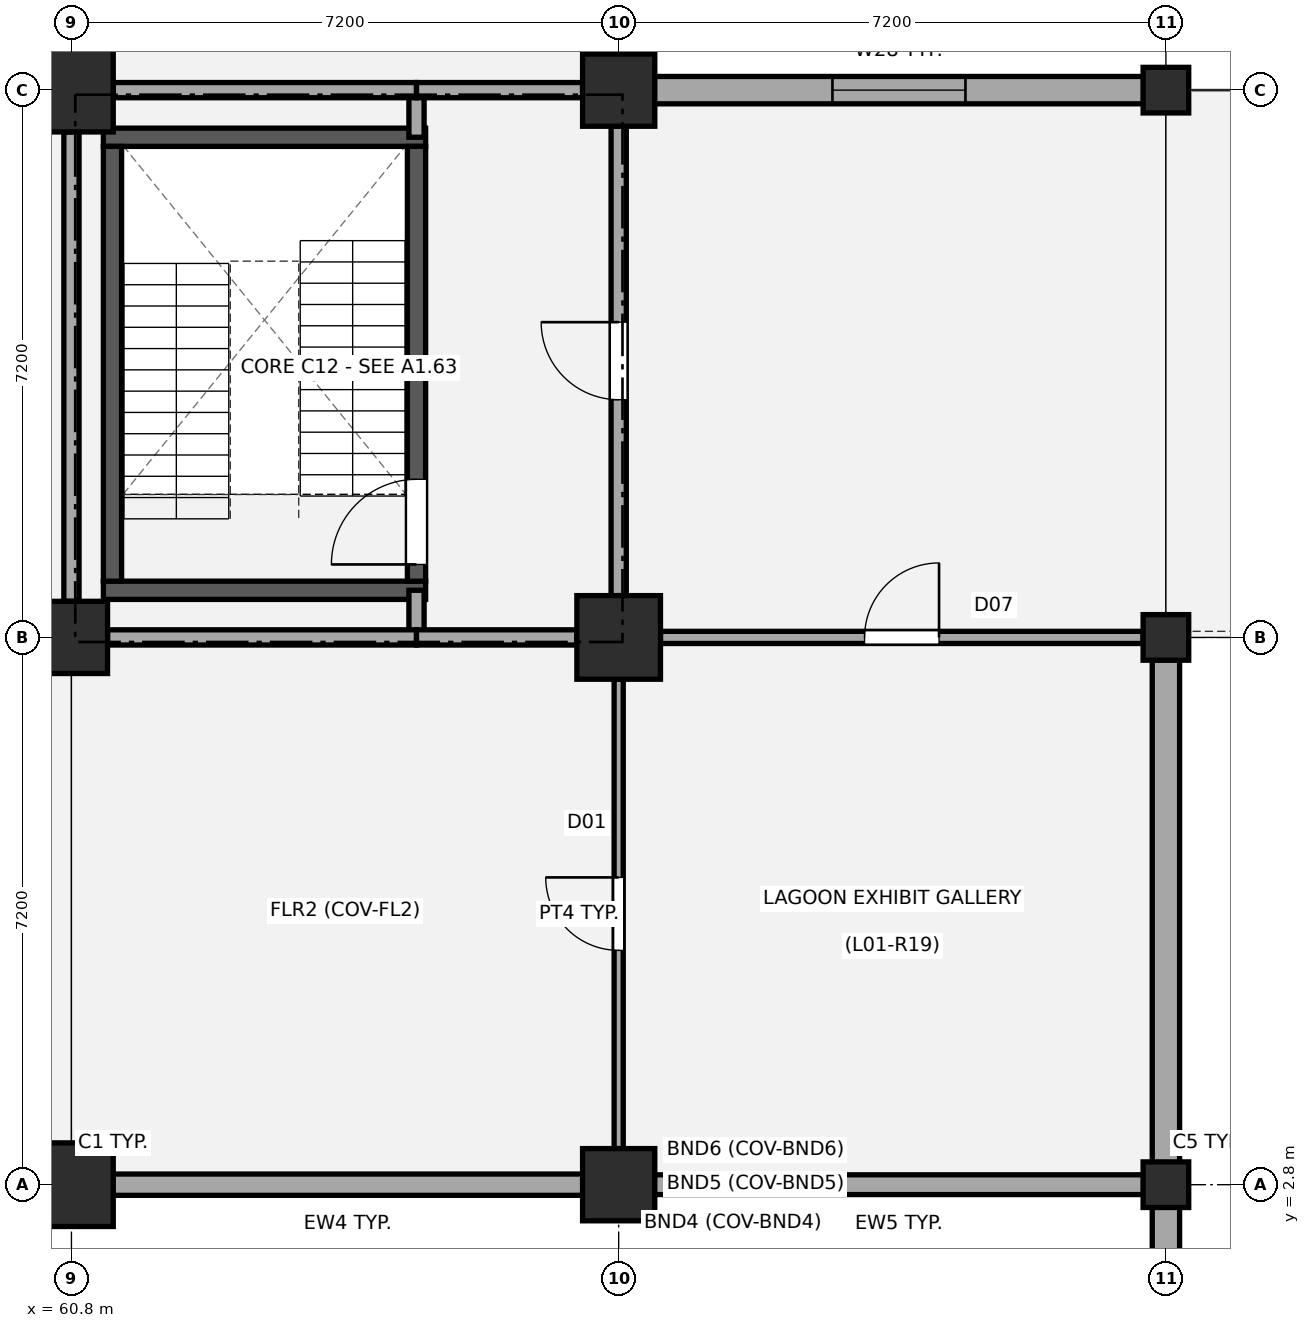
"""IFC4 building model, lengths in metres.
Left out: names, types, materials, properties, quantities, classifications, styles, units other than length and angle.
Written with IfcOpenShell. Run it as: python <this file> out.ifc"""

import sys

from ifc_helpers import new_model, si_unit, direction, frame, frame_2d, origin, origin_2d, place, context, subcontext, project, spatial, rectangle, extrude, element, fill, save


model = new_model("IFC4")
c1 = context("Model", 3, precision=1e-05, world=origin(), true_north=direction((0.0, 1.0)))
c2 = subcontext(c1, "Body", "Model", "MODEL_VIEW")
j1 = project(units=[si_unit("LENGTHUNIT", "METRE"), si_unit("PLANEANGLEUNIT", "RADIAN")], contexts=[c1])
p1 = place(None, origin())
s1 = spatial("IfcSite", under=j1, at=p1, CompositionType="ELEMENT")
p2 = place(p1, origin())
s2 = spatial("IfcBuilding", under=s1, at=p2, CompositionType="ELEMENT")
p3 = place(p2, frame((0.0, 0.0, 4.68)))
s3 = spatial("IfcBuildingStorey", under=s2, at=p3, CompositionType="ELEMENT", Elevation=4.68)
p4 = place(p3, frame((60.8, 2.8, 0.0), z_axis=(0.0, 0.0, 1.0), x_axis=(1.0, 0.0, 0.0)))
e1 = element("IfcColumn", 1, at=p4, inside=s3, PredefinedType="COLUMN", context=c2, shape_type="SweptSolid", body=[
    extrude(rectangle(XDim=1.1, YDim=1.1, at=origin_2d()), origin(), (0.0, 0.0, 1.0), 4.5),
])
p5 = place(p3, frame((60.8, 10.0, 0.0), z_axis=(0.0, 0.0, 1.0), x_axis=(1.0, 0.0, 0.0)))
e2 = element("IfcColumn", 2, at=p5, inside=s3, PredefinedType="COLUMN", context=c2, shape_type="SweptSolid", body=[
    extrude(rectangle(XDim=0.95, YDim=0.95, at=origin_2d()), origin(), (0.0, 0.0, 1.0), 4.5),
])
p6 = place(p3, frame((60.8, 17.2, 0.0), z_axis=(0.0, 0.0, 1.0), x_axis=(1.0, 0.0, 0.0)))
e3 = element("IfcColumn", 3, at=p6, inside=s3, PredefinedType="COLUMN", context=c2, shape_type="SweptSolid", body=[
    extrude(rectangle(XDim=1.1, YDim=1.1, at=origin_2d()), origin(), (0.0, 0.0, 1.0), 4.5),
])
p7 = place(p3, frame((68.0, 2.8, 0.0), z_axis=(0.0, 0.0, 1.0), x_axis=(1.0, 0.0, 0.0)))
e4 = element("IfcColumn", 4, at=p7, inside=s3, PredefinedType="COLUMN", context=c2, shape_type="SweptSolid", body=[
    extrude(rectangle(XDim=0.95, YDim=0.95, at=origin_2d()), origin(), (0.0, 0.0, 1.0), 4.5),
])
p8 = place(p3, frame((68.0, 10.0, 0.0), z_axis=(0.0, 0.0, 1.0), x_axis=(1.0, 0.0, 0.0)))
e5 = element("IfcColumn", 5, at=p8, inside=s3, PredefinedType="COLUMN", context=c2, shape_type="SweptSolid", body=[
    extrude(rectangle(XDim=1.1, YDim=1.1, at=origin_2d()), origin(), (0.0, 0.0, 1.0), 4.5),
])
p9 = place(p3, frame((68.0, 17.2, 0.0), z_axis=(0.0, 0.0, 1.0), x_axis=(1.0, 0.0, 0.0)))
e6 = element("IfcColumn", 6, at=p9, inside=s3, PredefinedType="COLUMN", context=c2, shape_type="SweptSolid", body=[
    extrude(rectangle(XDim=0.95, YDim=0.95, at=origin_2d()), origin(), (0.0, 0.0, 1.0), 4.5),
])
for number, where, z_axis, x_axis in (
    (7, (75.2, 2.8, 0.0), (0.0, 0.0, 1.0), (1.0, 0.0, 0.0)),
    (8, (75.2, 10.0, 0.0), (0.0, 0.0, 1.0), (1.0, 0.0, 0.0)),
    (9, (75.2, 17.2, 0.0), (0.0, 0.0, 1.0), (1.0, 0.0, 0.0)),
):
    element("IfcColumn", number, at=place(p3, frame(where, z_axis=z_axis, x_axis=x_axis)), inside=s3, PredefinedType="COLUMN", context=c2, shape_type="SweptSolid", body=[
        extrude(rectangle(XDim=0.6, YDim=0.6, at=origin_2d()), origin(), (0.0, 0.0, 1.0), 4.5),
    ])
p10 = place(p3, frame((67.53, 2.8, 0.0), z_axis=(0.0, 0.0, 1.0), x_axis=(-1.0, 0.0, 0.0)))
e10 = element("IfcWall", 10, at=p10, inside=s3, PredefinedType="STANDARD", context=c2, shape_type="SweptSolid", body=[
    extrude(rectangle(XDim=6.185, YDim=0.28, at=frame_2d((3.093, 0.0))), origin(), (0.0, 0.0, 1.0), 3.49),
])
p11 = place(p3, frame((74.905, 2.8, 0.0), z_axis=(0.0, 0.0, 1.0), x_axis=(-1.0, 0.0, 0.0)))
e11 = element("IfcWall", 11, at=p11, inside=s3, PredefinedType="STANDARD", context=c2, shape_type="SweptSolid", body=[
    extrude(rectangle(XDim=6.435, YDim=0.26, at=frame_2d((3.218, 0.0))), origin(), (0.0, 0.0, 1.0), 3.51),
])
p12 = place(p3, frame((68.47, 17.2, 0.0), z_axis=(0.0, 0.0, 1.0), x_axis=(1.0, 0.0, 0.0)))
e12 = element("IfcWall", 12, at=p12, inside=s3, PredefinedType="STANDARD", context=c2, shape_type="SweptSolid", body=[
    extrude(rectangle(XDim=6.435, YDim=0.36, at=frame_2d((3.218, 0.0))), origin(), (0.0, 0.0, 1.0), 3.49),
])
p13 = place(p12, frame((2.343, 0.0, 0.95)))
e13 = element("IfcOpeningElement", 13, at=p13, cuts=e12, PredefinedType="OPENING", context=c2, shape_type="SweptSolid", body=[
    extrude(rectangle(XDim=1.75, YDim=1.3, at=frame_2d((0.875, 0.65))), frame((0.0, 0.19, 0.0), z_axis=(0.0, -1.0, 0.0), x_axis=(1.0, 0.0, 0.0)), (0.0, 0.0, 1.0), 0.38),
])
p14 = place(p3, frame((68.0, 23.855, 0.0), z_axis=(0.0, 0.0, 1.0), x_axis=(0.0, -1.0, 0.0)))
e14 = element("IfcWall", 14, at=p14, inside=s3, PredefinedType="STANDARD", context=c2, shape_type="SweptSolid", body=[
    extrude(rectangle(XDim=6.185, YDim=0.36, at=frame_2d((3.093, 0.0))), origin(), (0.0, 0.0, 1.0), 3.49),
])
p15 = place(p3, frame((75.2, 1.56, 0.0), z_axis=(0.0, 0.0, 1.0), x_axis=(0.0, 1.0, 0.0)))
e15 = element("IfcWall", 15, at=p15, inside=s3, PredefinedType="STANDARD", context=c2, shape_type="SweptSolid", body=[
    extrude(rectangle(XDim=8.145, YDim=0.36, at=frame_2d((4.073, 0.0))), origin(), (0.0, 0.0, 1.0), 3.49),
])
p16 = place(p2, origin())
s4 = spatial("IfcBuildingStorey", under=s2, at=p16, CompositionType="ELEMENT", Elevation=0.0)
p17 = place(p16, frame((75.2, 6.56, 0.0), z_axis=(0.0, 0.0, 1.0), x_axis=(1.0, 0.0, 0.0)))
e16 = element("IfcWall", 16, at=p17, inside=s4, PredefinedType="STANDARD", context=c2, shape_type="SweptSolid", body=[
    extrude(rectangle(XDim=1.4, YDim=0.34, at=frame_2d((0.7, 0.0))), origin(), (0.0, 0.0, 1.0), 8.87),
])
for number, where, z_axis, x_axis in (
    (17, (61.22, 10.62, 0.0), (0.0, 0.0, 1.0), (1.0, 0.0, 0.0)),
    (18, (61.22, 16.58, 0.0), (0.0, 0.0, 1.0), (1.0, 0.0, 0.0)),
):
    element("IfcWall", number, at=place(p3, frame(where, z_axis=z_axis, x_axis=x_axis)), inside=s3, PredefinedType="SHEAR", context=c2, shape_type="SweptSolid", body=[
        extrude(rectangle(XDim=4.24, YDim=0.24, at=frame_2d((2.12, 0.0))), origin(), (0.0, 0.0, 1.0), 4.22),
    ])
p18 = place(p3, frame((61.34, 10.74, 0.0), z_axis=(0.0, 0.0, 1.0), x_axis=(0.0, 1.0, 0.0)))
e19 = element("IfcWall", 19, at=p18, inside=s3, PredefinedType="SHEAR", context=c2, shape_type="SweptSolid", body=[
    extrude(rectangle(XDim=5.72, YDim=0.24, at=frame_2d((2.86, 0.0))), origin(), (0.0, 0.0, 1.0), 4.22),
])
p19 = place(p3, frame((65.34, 10.74, 0.0), z_axis=(0.0, 0.0, 1.0), x_axis=(0.0, 1.0, 0.0)))
e20 = element("IfcWall", 20, at=p19, inside=s3, PredefinedType="SHEAR", context=c2, shape_type="SweptSolid", body=[
    extrude(rectangle(XDim=5.72, YDim=0.24, at=frame_2d((2.86, 0.0))), origin(), (0.0, 0.0, 1.0), 4.22),
])
p20 = place(p19, frame((0.22, 0.0, 0.0)))
e21 = element("IfcOpeningElement", 21, at=p20, cuts=e20, PredefinedType="OPENING", context=c2, shape_type="SweptSolid", body=[
    extrude(rectangle(XDim=1.12, YDim=2.15, at=frame_2d((0.56, 1.075))), frame((0.0, 0.13, 0.0), z_axis=(0.0, -1.0, 0.0), x_axis=(1.0, 0.0, 0.0)), (0.0, 0.0, 1.0), 0.26),
])
p21 = place(p3, frame((65.34, 10.0, 0.0), z_axis=(0.0, 0.0, 1.0), x_axis=(0.0, 1.0, 0.0)))
e22 = element("IfcWall", 22, at=p21, inside=s3, PredefinedType="PARTITIONING", context=c2, shape_type="SweptSolid", body=[
    extrude(rectangle(XDim=0.62, YDim=0.2, at=frame_2d((0.31, 0.0))), origin(), (0.0, 0.0, 1.0), 3.59),
])
p22 = place(p3, frame((65.34, 16.58, 0.0), z_axis=(0.0, 0.0, 1.0), x_axis=(0.0, 1.0, 0.0)))
e23 = element("IfcWall", 23, at=p22, inside=s3, PredefinedType="PARTITIONING", context=c2, shape_type="SweptSolid", body=[
    extrude(rectangle(XDim=0.62, YDim=0.2, at=frame_2d((0.31, 0.0))), origin(), (0.0, 0.0, 1.0), 3.54),
])
p23 = place(p3, frame((60.8, 10.475, 0.0), z_axis=(0.0, 0.0, 1.0), x_axis=(0.0, 1.0, 0.0)))
e24 = element("IfcWall", 24, at=p23, inside=s3, PredefinedType="PARTITIONING", context=c2, shape_type="SweptSolid", body=[
    extrude(rectangle(XDim=6.175, YDim=0.2, at=frame_2d((3.087, 0.0))), origin(), (0.0, 0.0, 1.0), 3.59),
])
p24 = place(p3, frame((68.0, 10.55, 0.0), z_axis=(0.0, 0.0, 1.0), x_axis=(0.0, 1.0, 0.0)))
e25 = element("IfcWall", 25, at=p24, inside=s3, PredefinedType="PARTITIONING", context=c2, shape_type="SweptSolid", body=[
    extrude(rectangle(XDim=6.175, YDim=0.2, at=frame_2d((3.087, 0.0))), origin(), (0.0, 0.0, 1.0), 3.59),
])
p25 = place(p24, frame((2.577, 0.0, 0.0)))
e26 = element("IfcOpeningElement", 26, at=p25, cuts=e25, PredefinedType="OPENING", context=c2, shape_type="SweptSolid", body=[
    extrude(rectangle(XDim=1.02, YDim=2.15, at=frame_2d((0.51, 1.075))), frame((0.0, 0.11, 0.0), z_axis=(0.0, -1.0, 0.0), x_axis=(1.0, 0.0, 0.0)), (0.0, 0.0, 1.0), 0.22),
])
p26 = place(p3, frame((61.275, 10.0, 0.0), z_axis=(0.0, 0.0, 1.0), x_axis=(1.0, 0.0, 0.0)))
e27 = element("IfcWall", 27, at=p26, inside=s3, PredefinedType="PARTITIONING", context=c2, shape_type="SweptSolid", body=[
    extrude(rectangle(XDim=4.065, YDim=0.2, at=frame_2d((2.033, 0.0))), origin(), (0.0, 0.0, 1.0), 3.59),
])
p27 = place(p3, frame((65.34, 10.0, 0.0), z_axis=(0.0, 0.0, 1.0), x_axis=(1.0, 0.0, 0.0)))
e28 = element("IfcWall", 28, at=p27, inside=s3, PredefinedType="PARTITIONING", context=c2, shape_type="SweptSolid", body=[
    extrude(rectangle(XDim=2.11, YDim=0.2, at=frame_2d((1.055, 0.0))), origin(), (0.0, 0.0, 1.0), 3.59),
])
p28 = place(p3, frame((61.35, 17.2, 0.0), z_axis=(0.0, 0.0, 1.0), x_axis=(1.0, 0.0, 0.0)))
e29 = element("IfcWall", 29, at=p28, inside=s3, PredefinedType="PARTITIONING", context=c2, shape_type="SweptSolid", body=[
    extrude(rectangle(XDim=3.99, YDim=0.2, at=frame_2d((1.995, 0.0))), origin(), (0.0, 0.0, 1.0), 3.54),
])
p29 = place(p3, frame((65.34, 17.2, 0.0), z_axis=(0.0, 0.0, 1.0), x_axis=(1.0, 0.0, 0.0)))
e30 = element("IfcWall", 30, at=p29, inside=s3, PredefinedType="PARTITIONING", context=c2, shape_type="SweptSolid", body=[
    extrude(rectangle(XDim=2.185, YDim=0.2, at=frame_2d((1.092, 0.0))), origin(), (0.0, 0.0, 1.0), 3.54),
])
p30 = place(p3, frame((68.0, 3.275, 0.0), z_axis=(0.0, 0.0, 1.0), x_axis=(0.0, 1.0, 0.0)))
e31 = element("IfcWall", 31, at=p30, inside=s3, PredefinedType="PARTITIONING", context=c2, shape_type="SweptSolid", body=[
    extrude(rectangle(XDim=6.175, YDim=0.12, at=frame_2d((3.087, 0.0))), origin(), (0.0, 0.0, 1.0), 3.54),
])
p31 = place(p30, frame((2.607, 0.0, 0.0)))
e32 = element("IfcOpeningElement", 32, at=p31, cuts=e31, PredefinedType="OPENING", context=c2, shape_type="SweptSolid", body=[
    extrude(rectangle(XDim=0.96, YDim=2.1, at=frame_2d((0.48, 1.05))), frame((0.0, 0.07, 0.0), z_axis=(0.0, -1.0, 0.0), x_axis=(1.0, 0.0, 0.0)), (0.0, 0.0, 1.0), 0.14),
])
p32 = place(p3, frame((68.55, 10.0, 0.0), z_axis=(0.0, 0.0, 1.0), x_axis=(1.0, 0.0, 0.0)))
e33 = element("IfcWall", 33, at=p32, inside=s3, PredefinedType="PARTITIONING", context=c2, shape_type="SweptSolid", body=[
    extrude(rectangle(XDim=6.35, YDim=0.16, at=frame_2d((3.175, 0.0))), origin(), (0.0, 0.0, 1.0), 3.54),
])
p33 = place(p32, frame((2.685, 0.0, 0.0)))
e34 = element("IfcOpeningElement", 34, at=p33, cuts=e33, PredefinedType="OPENING", context=c2, shape_type="SweptSolid", body=[
    extrude(rectangle(XDim=0.98, YDim=2.12, at=frame_2d((0.49, 1.06))), frame((0.0, 0.09, 0.0), z_axis=(0.0, -1.0, 0.0), x_axis=(1.0, 0.0, 0.0)), (0.0, 0.0, 1.0), 0.18),
])
p34 = place(p13, origin())
e35 = element("IfcWindow", 35, at=p34, inside=s3, PartitioningType="SINGLE_PANEL", PredefinedType="WINDOW", context=c2, shape_type="SweptSolid", body=[
    extrude(rectangle(XDim=1.75, YDim=1.3, at=frame_2d((0.875, 0.65))), frame((0.0, 0.03, 0.0), z_axis=(0.0, -1.0, 0.0), x_axis=(1.0, 0.0, 0.0)), (0.0, 0.0, 1.0), 0.06),
])
fill(e13, e35)
p35 = place(p20, origin())
e36 = element("IfcDoor", 36, at=p35, inside=s3, OperationType="SINGLE_SWING_LEFT", PredefinedType="DOOR", context=c2, shape_type="SweptSolid", body=[
    extrude(rectangle(XDim=1.12, YDim=2.15, at=frame_2d((0.56, 1.075))), frame((0.0, 0.025, 0.0), z_axis=(0.0, -1.0, 0.0), x_axis=(1.0, 0.0, 0.0)), (0.0, 0.0, 1.0), 0.05),
])
fill(e21, e36)
p36 = place(p25, origin())
e37 = element("IfcDoor", 37, at=p36, inside=s3, OperationType="SINGLE_SWING_RIGHT", PredefinedType="DOOR", context=c2, shape_type="SweptSolid", body=[
    extrude(rectangle(XDim=1.02, YDim=2.15, at=frame_2d((0.51, 1.075))), frame((0.0, 0.025, 0.0), z_axis=(0.0, -1.0, 0.0), x_axis=(1.0, 0.0, 0.0)), (0.0, 0.0, 1.0), 0.05),
])
fill(e26, e37)
p37 = place(p31, origin())
e38 = element("IfcDoor", 38, at=p37, inside=s3, OperationType="SINGLE_SWING_RIGHT", PredefinedType="DOOR", context=c2, shape_type="SweptSolid", body=[
    extrude(rectangle(XDim=0.96, YDim=2.1, at=frame_2d((0.48, 1.05))), frame((0.0, 0.025, 0.0), z_axis=(0.0, -1.0, 0.0), x_axis=(1.0, 0.0, 0.0)), (0.0, 0.0, 1.0), 0.05),
])
fill(e32, e38)
p38 = place(p33, origin())
e39 = element("IfcDoor", 39, at=p38, inside=s3, OperationType="SINGLE_SWING_RIGHT", PredefinedType="DOOR", context=c2, shape_type="SweptSolid", body=[
    extrude(rectangle(XDim=0.98, YDim=2.12, at=frame_2d((0.49, 1.06))), frame((0.0, 0.025, 0.0), z_axis=(0.0, -1.0, 0.0), x_axis=(1.0, 0.0, 0.0)), (0.0, 0.0, 1.0), 0.05),
])
fill(e34, e39)
save(model, sys.argv[1])
